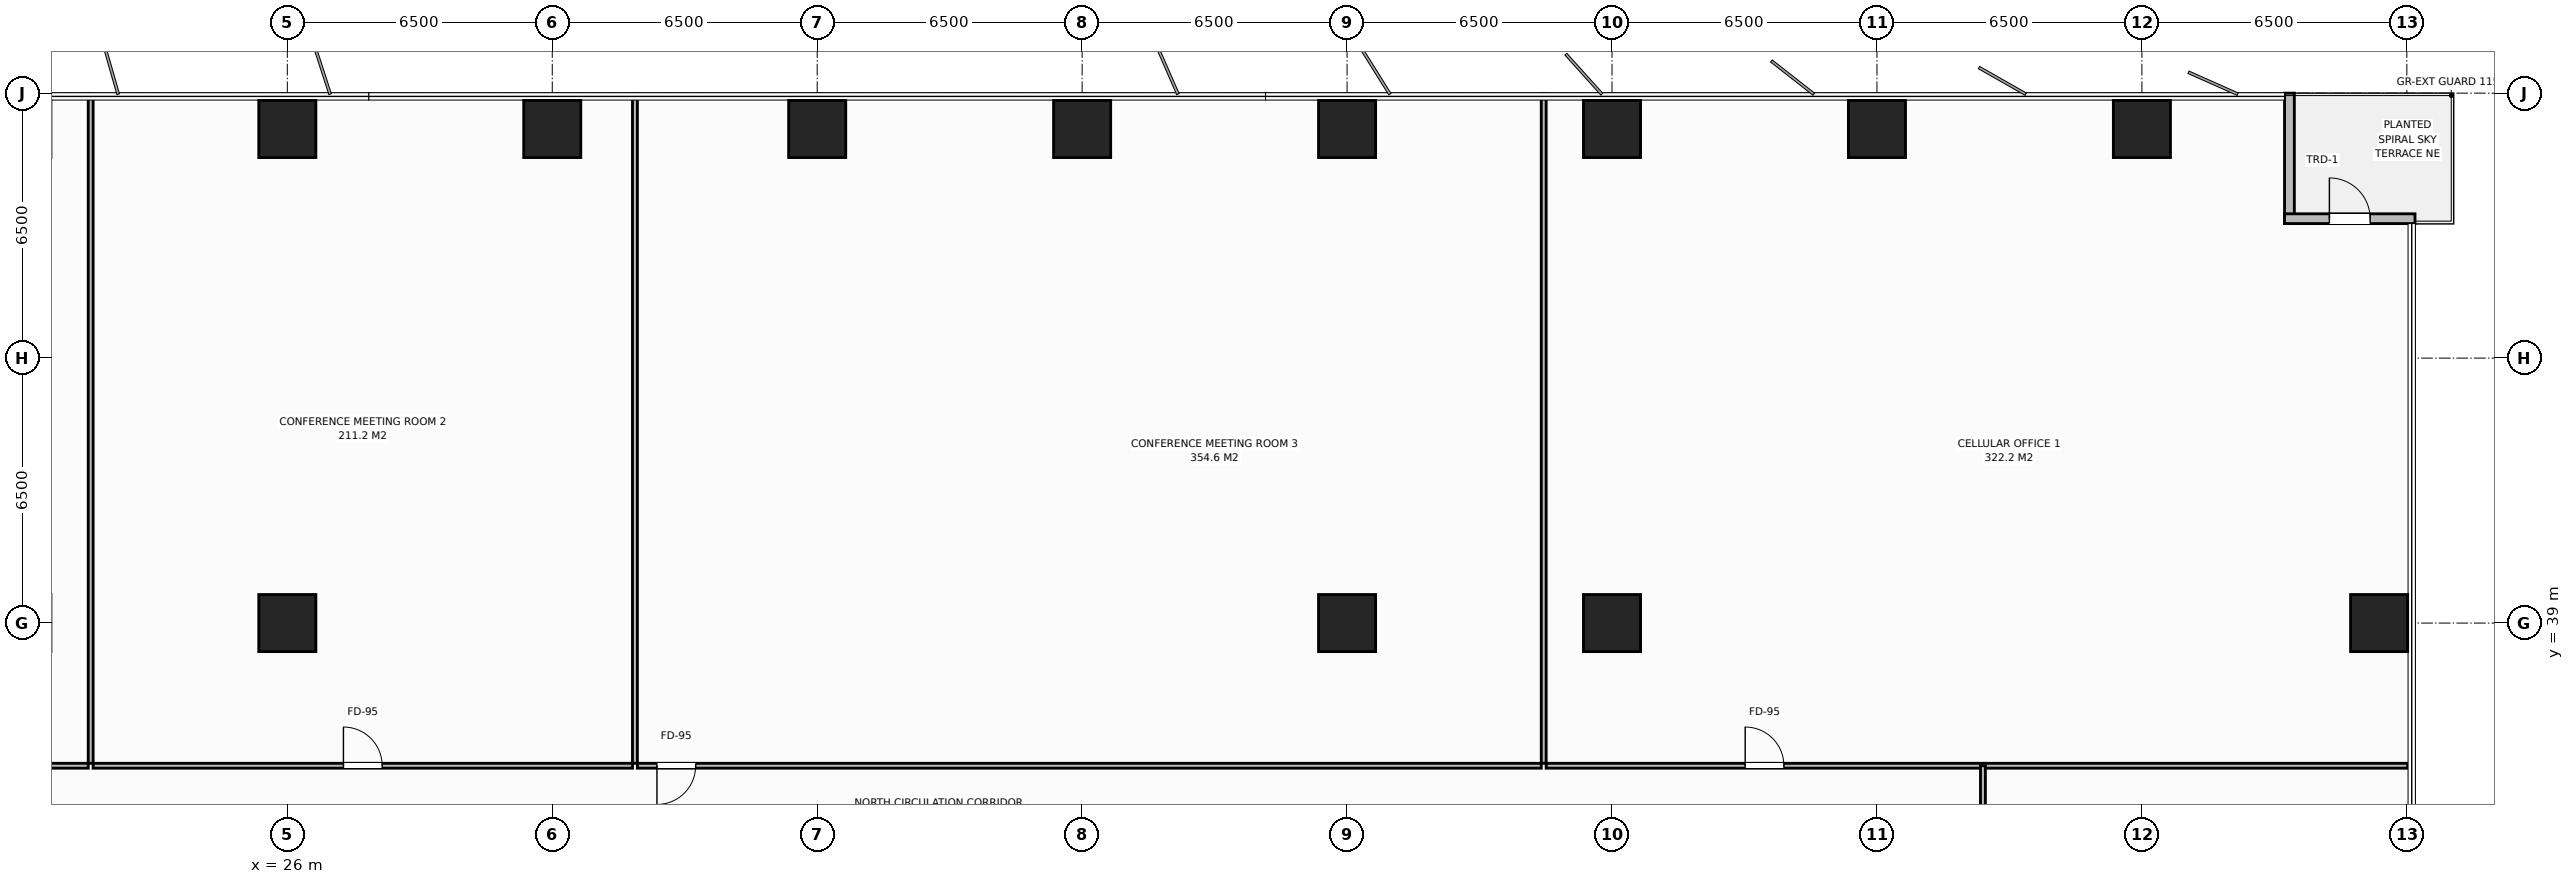
"""IFC4 building model, lengths in metres.
Left out: names, types, materials, properties, quantities, classifications, styles, units other than length and angle.
Written with IfcOpenShell. Run it as: python <this file> out.ifc"""

import sys

from ifc_helpers import new_model, si_unit, direction, frame, frame_2d, origin, origin_2d, place, context, subcontext, project, spatial, rectangle, extrude, element, fill, save


model = new_model("IFC4")
c1 = context("Model", 3, precision=1e-05, world=origin(), true_north=direction((0.0, 1.0)))
c2 = subcontext(c1, "Body", "Model", "MODEL_VIEW")
j1 = project(units=[si_unit("LENGTHUNIT", "METRE"), si_unit("PLANEANGLEUNIT", "RADIAN")], contexts=[c1])
p1 = place(None, origin())
s1 = spatial("IfcSite", under=j1, at=p1, CompositionType="ELEMENT")
p2 = place(p1, origin())
s2 = spatial("IfcBuilding", under=s1, at=p2, CompositionType="ELEMENT")
p3 = place(p2, frame((0.0, 0.0, 65.8)))
s3 = spatial("IfcBuildingStorey", under=s2, at=p3, CompositionType="ELEMENT", Elevation=65.8)
for number, where, z_axis, x_axis in (
    (1, (58.5, 39.0, 0.0), (0.0, 0.0, 1.0), (1.0, 0.0, 0.0)),
    (2, (26.0, 39.0, 0.0), (0.0, 0.0, 1.0), (1.0, 0.0, 0.0)),
    (3, (52.0, 39.0, 0.0), (0.0, 0.0, 1.0), (1.0, 0.0, 0.0)),
    (4, (26.0, 51.12, 0.0), (0.0, 0.0, 1.0), (1.0, 0.0, 0.0)),
    (5, (32.5, 51.12, 0.0), (0.0, 0.0, 1.0), (1.0, 0.0, 0.0)),
    (6, (39.0, 51.12, 0.0), (0.0, 0.0, 1.0), (1.0, 0.0, 0.0)),
    (7, (45.5, 51.12, 0.0), (0.0, 0.0, 1.0), (1.0, 0.0, 0.0)),
    (8, (52.0, 51.12, 0.0), (0.0, 0.0, 1.0), (1.0, 0.0, 0.0)),
    (9, (58.5, 51.12, 0.0), (0.0, 0.0, 1.0), (1.0, 0.0, 0.0)),
    (10, (65.0, 51.12, 0.0), (0.0, 0.0, 1.0), (1.0, 0.0, 0.0)),
    (11, (71.5, 51.12, 0.0), (0.0, 0.0, 1.0), (1.0, 0.0, 0.0)),
    (12, (77.32, 39.0, 0.0), (0.0, 0.0, 1.0), (1.0, 0.0, 0.0)),
):
    element("IfcColumn", number, at=place(p3, frame(where, z_axis=z_axis, x_axis=x_axis)), inside=s3, PredefinedType="COLUMN", context=c2, shape_type="SweptSolid", body=[
        extrude(rectangle(XDim=1.4, YDim=1.4, at=origin_2d()), origin(), (0.0, 0.0, 1.0), 3.8),
    ])
p4 = place(p3, frame((75.12, 52.0, 0.0), z_axis=(0.0, 0.0, 1.0), x_axis=(0.0, -1.0, 0.0)))
e13 = element("IfcWall", 13, at=p4, inside=s3, PredefinedType="STANDARD", context=c2, shape_type="SweptSolid", body=[
    extrude(rectangle(XDim=3.2, YDim=0.24, at=frame_2d((1.6, 0.0))), origin(), (0.0, 0.0, 1.0), 3.55),
])
p5 = place(p3, frame((75.0, 48.92, 0.0), z_axis=(0.0, 0.0, 1.0), x_axis=(1.0, 0.0, 0.0)))
e14 = element("IfcWall", 14, at=p5, inside=s3, PredefinedType="STANDARD", context=c2, shape_type="SweptSolid", body=[
    extrude(rectangle(XDim=3.2, YDim=0.24, at=frame_2d((1.6, 0.0))), origin(), (0.0, 0.0, 1.0), 3.55),
])
p6 = place(p5, frame((1.1, 0.0, 0.0)))
e15 = element("IfcOpeningElement", 15, at=p6, cuts=e14, PredefinedType="OPENING", context=c2, shape_type="SweptSolid", body=[
    extrude(rectangle(XDim=1.0, YDim=2.2, at=frame_2d((0.5, 1.1))), frame((0.0, 0.13, 0.0), z_axis=(0.0, -1.0, 0.0), x_axis=(1.0, 0.0, 0.0)), (0.0, 0.0, 1.0), 0.26),
])
p7 = place(p3, frame((21.176, 35.56, 0.0), z_axis=(0.0, 0.0, 1.0), x_axis=(0.0, 1.0, 0.0)))
e16 = element("IfcWall", 16, at=p7, inside=s3, PredefinedType="PARTITIONING", context=c2, shape_type="SweptSolid", body=[
    extrude(rectangle(XDim=16.42, YDim=0.12, at=frame_2d((8.21, 0.0))), origin(), (0.0, 0.0, 1.0), 3.55),
])
p8 = place(p3, frame((-0.02, 35.5, 0.0), z_axis=(0.0, 0.0, 1.0), x_axis=(1.0, 0.0, 0.0)))
e17 = element("IfcWall", 17, at=p8, inside=s3, PredefinedType="PARTITIONING", context=c2, shape_type="SweptSolid", body=[
    extrude(rectangle(XDim=21.136, YDim=0.12, at=frame_2d((10.568, 0.0))), origin(), (0.0, 0.0, 1.0), 3.55),
])
p9 = place(p8, frame((15.303, 0.0, 0.0)))
e18 = element("IfcOpeningElement", 18, at=p9, cuts=e17, PredefinedType="OPENING", context=c2, shape_type="SweptSolid", body=[
    extrude(rectangle(XDim=0.95, YDim=2.15, at=frame_2d((0.475, 1.075))), frame((0.0, 0.07, 0.0), z_axis=(0.0, -1.0, 0.0), x_axis=(1.0, 0.0, 0.0)), (0.0, 0.0, 1.0), 0.14),
])
p10 = place(p3, frame((34.528, 35.56, 0.0), z_axis=(0.0, 0.0, 1.0), x_axis=(0.0, 1.0, 0.0)))
e19 = element("IfcWall", 19, at=p10, inside=s3, PredefinedType="PARTITIONING", context=c2, shape_type="SweptSolid", body=[
    extrude(rectangle(XDim=16.42, YDim=0.12, at=frame_2d((8.21, 0.0))), origin(), (0.0, 0.0, 1.0), 3.55),
])
p11 = place(p3, frame((21.236, 35.5, 0.0), z_axis=(0.0, 0.0, 1.0), x_axis=(1.0, 0.0, 0.0)))
e20 = element("IfcWall", 20, at=p11, inside=s3, PredefinedType="PARTITIONING", context=c2, shape_type="SweptSolid", body=[
    extrude(rectangle(XDim=13.233, YDim=0.12, at=frame_2d((6.616, 0.0))), origin(), (0.0, 0.0, 1.0), 3.55),
])
p12 = place(p11, frame((6.141, 0.0, 0.0)))
e21 = element("IfcOpeningElement", 21, at=p12, cuts=e20, PredefinedType="OPENING", context=c2, shape_type="SweptSolid", body=[
    extrude(rectangle(XDim=0.95, YDim=2.15, at=frame_2d((0.475, 1.075))), frame((0.0, 0.07, 0.0), z_axis=(0.0, -1.0, 0.0), x_axis=(1.0, 0.0, 0.0)), (0.0, 0.0, 1.0), 0.14),
])
p13 = place(p3, frame((56.824, 35.56, 0.0), z_axis=(0.0, 0.0, 1.0), x_axis=(0.0, 1.0, 0.0)))
e22 = element("IfcWall", 22, at=p13, inside=s3, PredefinedType="PARTITIONING", context=c2, shape_type="SweptSolid", body=[
    extrude(rectangle(XDim=16.42, YDim=0.12, at=frame_2d((8.21, 0.0))), origin(), (0.0, 0.0, 1.0), 3.55),
])
p14 = place(p3, frame((34.588, 35.5, 0.0), z_axis=(0.0, 0.0, 1.0), x_axis=(1.0, 0.0, 0.0)))
e23 = element("IfcWall", 23, at=p14, inside=s3, PredefinedType="PARTITIONING", context=c2, shape_type="SweptSolid", body=[
    extrude(rectangle(XDim=22.176, YDim=0.12, at=frame_2d((11.088, 0.0))), origin(), (0.0, 0.0, 1.0), 3.55),
])
p15 = place(p14, frame((0.48, 0.0, 0.0)))
e24 = element("IfcOpeningElement", 24, at=p15, cuts=e23, PredefinedType="OPENING", context=c2, shape_type="SweptSolid", body=[
    extrude(rectangle(XDim=0.95, YDim=2.15, at=frame_2d((0.475, 1.075))), frame((0.0, 0.07, 0.0), z_axis=(0.0, -1.0, 0.0), x_axis=(1.0, 0.0, 0.0)), (0.0, 0.0, 1.0), 0.14),
])
p16 = place(p3, frame((56.884, 35.5, 0.0), z_axis=(0.0, 0.0, 1.0), x_axis=(1.0, 0.0, 0.0)))
e25 = element("IfcWall", 25, at=p16, inside=s3, PredefinedType="PARTITIONING", context=c2, shape_type="SweptSolid", body=[
    extrude(rectangle(XDim=21.136, YDim=0.12, at=frame_2d((10.568, 0.0))), origin(), (0.0, 0.0, 1.0), 3.55),
])
p17 = place(p16, frame((4.883, 0.0, 0.0)))
e26 = element("IfcOpeningElement", 26, at=p17, cuts=e25, PredefinedType="OPENING", context=c2, shape_type="SweptSolid", body=[
    extrude(rectangle(XDim=0.95, YDim=2.15, at=frame_2d((0.475, 1.075))), frame((0.0, 0.07, 0.0), z_axis=(0.0, -1.0, 0.0), x_axis=(1.0, 0.0, 0.0)), (0.0, 0.0, 1.0), 0.14),
])
p18 = place(p3, frame((67.6, 26.0, 0.0), z_axis=(0.0, 0.0, 1.0), x_axis=(0.0, 1.0, 0.0)))
e27 = element("IfcWall", 27, at=p18, inside=s3, PredefinedType="PARTITIONING", context=c2, shape_type="SweptSolid", body=[
    extrude(rectangle(XDim=9.5, YDim=0.12, at=frame_2d((4.75, 0.0))), origin(), (0.0, 0.0, 1.0), 3.55),
])
p19 = place(p18, frame((3.225, 0.0, 0.0)))
e28 = element("IfcOpeningElement", 28, at=p19, cuts=e27, PredefinedType="OPENING", context=c2, shape_type="SweptSolid", body=[
    extrude(rectangle(XDim=0.95, YDim=2.15, at=frame_2d((0.475, 1.075))), frame((0.0, 0.07, 0.0), z_axis=(0.0, -1.0, 0.0), x_axis=(1.0, 0.0, 0.0)), (0.0, 0.0, 1.0), 0.14),
])
p20 = place(p6, origin())
e29 = element("IfcDoor", 29, at=p20, inside=s3, OperationType="SINGLE_SWING_LEFT", PredefinedType="DOOR", context=c2, shape_type="SweptSolid", body=[
    extrude(rectangle(XDim=1.0, YDim=2.2, at=frame_2d((0.5, 1.1))), frame((0.0, 0.025, 0.0), z_axis=(0.0, -1.0, 0.0), x_axis=(1.0, 0.0, 0.0)), (0.0, 0.0, 1.0), 0.05),
])
fill(e15, e29)
p21 = place(p12, origin())
e30 = element("IfcDoor", 30, at=p21, inside=s3, OperationType="SINGLE_SWING_LEFT", PredefinedType="DOOR", context=c2, shape_type="SweptSolid", body=[
    extrude(rectangle(XDim=0.95, YDim=2.15, at=frame_2d((0.475, 1.075))), frame((0.0, 0.025, 0.0), z_axis=(0.0, -1.0, 0.0), x_axis=(1.0, 0.0, 0.0)), (0.0, 0.0, 1.0), 0.05),
])
fill(e21, e30)
p22 = place(p15, origin())
e31 = element("IfcDoor", 31, at=p22, inside=s3, OperationType="SINGLE_SWING_RIGHT", PredefinedType="DOOR", context=c2, shape_type="SweptSolid", body=[
    extrude(rectangle(XDim=0.95, YDim=2.15, at=frame_2d((0.475, 1.075))), frame((0.0, 0.025, 0.0), z_axis=(0.0, -1.0, 0.0), x_axis=(1.0, 0.0, 0.0)), (0.0, 0.0, 1.0), 0.05),
])
fill(e24, e31)
p23 = place(p17, origin())
e32 = element("IfcDoor", 32, at=p23, inside=s3, OperationType="SINGLE_SWING_LEFT", PredefinedType="DOOR", context=c2, shape_type="SweptSolid", body=[
    extrude(rectangle(XDim=0.95, YDim=2.15, at=frame_2d((0.475, 1.075))), frame((0.0, 0.025, 0.0), z_axis=(0.0, -1.0, 0.0), x_axis=(1.0, 0.0, 0.0)), (0.0, 0.0, 1.0), 0.05),
])
fill(e26, e32)
save(model, sys.argv[1])
